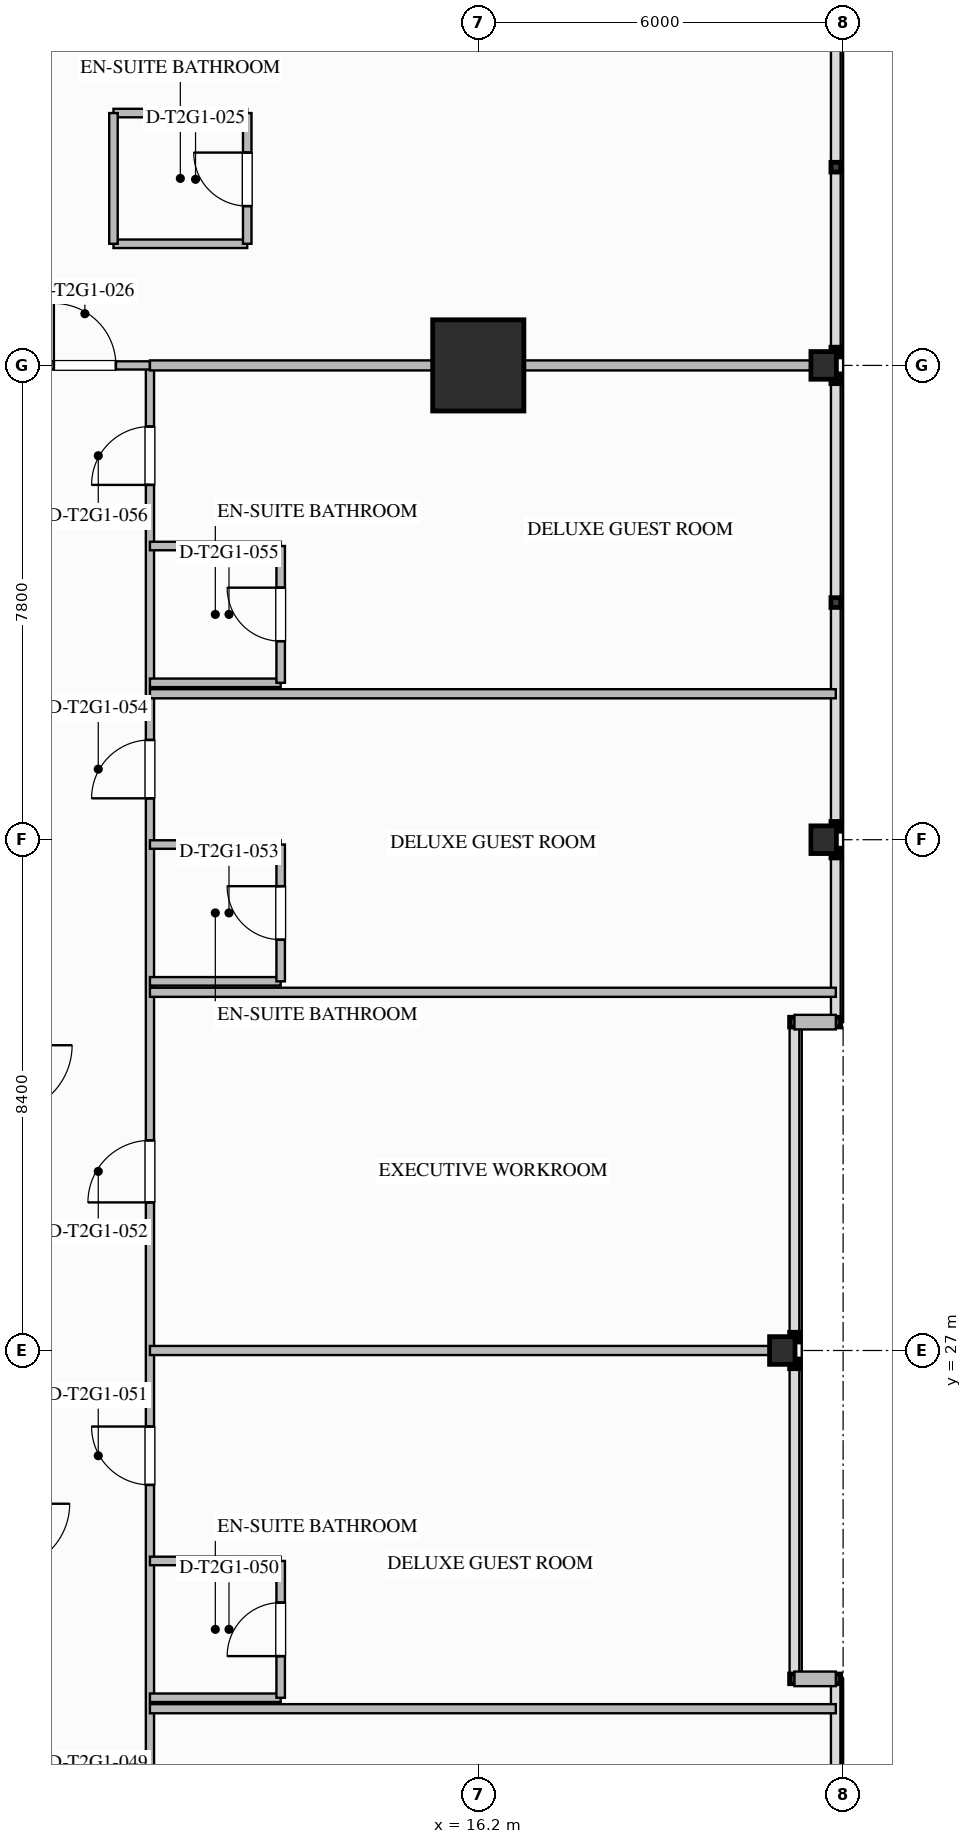
"""IFC4 building model, lengths in metres.
Left out: names, types, materials, properties, quantities, classifications, styles, units other than length and angle.
Written with IfcOpenShell. Run it as: python <this file> out.ifc"""

import sys

from ifc_helpers import new_model, si_unit, direction, frame, frame_2d, origin, origin_2d, place, context, subcontext, project, spatial, rectangle, i_section, extrude, element, fill, save


model = new_model("IFC4")
c1 = context("Model", 3, precision=1e-05, world=origin(), true_north=direction((0.0, 1.0)))
c2 = subcontext(c1, "Body", "Model", "MODEL_VIEW")
j1 = project(units=[si_unit("LENGTHUNIT", "METRE"), si_unit("PLANEANGLEUNIT", "RADIAN")], contexts=[c1])
p1 = place(None, origin())
s1 = spatial("IfcSite", under=j1, at=p1, CompositionType="ELEMENT")
p2 = place(p1, origin())
s2 = spatial("IfcBuilding", under=s1, at=p2, CompositionType="ELEMENT")
p3 = place(p2, frame((0.0, 0.0, 91.8)))
s3 = spatial("IfcBuildingStorey", under=s2, at=p3, CompositionType="ELEMENT", Elevation=91.8)
p4 = place(p3, frame((16.2, 43.2, 0.0), z_axis=(0.0, 0.0, 1.0), x_axis=(1.0, 0.0, 0.0)))
e1 = element("IfcColumn", 1, at=p4, inside=s3, PredefinedType="COLUMN", context=c2, shape_type="SweptSolid", body=[
    extrude(rectangle(XDim=1.5, YDim=1.5, at=origin_2d()), origin(), (0.0, 0.0, 1.0), 3.5),
])
for number, where, z_axis, x_axis in (
    (2, (21.2, 27.0, 0.0), (0.0, 0.0, 1.0), (1.0, 0.0, 0.0)),
    (3, (21.88, 35.4, 0.0), (0.0, 0.0, 1.0), (1.0, 0.0, 0.0)),
    (4, (21.88, 43.2, 0.0), (0.0, 0.0, 1.0), (1.0, 0.0, 0.0)),
):
    element("IfcColumn", number, at=place(p3, frame(where, z_axis=z_axis, x_axis=x_axis)), inside=s3, PredefinedType="COLUMN", context=c2, shape_type="SweptSolid", body=[
        extrude(i_section(OverallWidth=0.418, OverallDepth=0.455, WebThickness=0.042, FlangeThickness=0.068, FilletRadius=0.03, at=origin_2d()), origin(), (0.0, 0.0, 1.0), 3.497),
    ])
for number, where, z_axis, x_axis in (
    (5, (22.08, 32.4, 0.0), (0.0, 0.0, 1.0), (-1.0, 0.0, 0.0)),
    (6, (21.4, 21.6, 0.0), (0.0, 0.0, 1.0), (1.0, 0.0, 0.0)),
):
    element("IfcWall", number, at=place(p3, frame(where, z_axis=z_axis, x_axis=x_axis)), inside=s3, PredefinedType="STANDARD", context=c2, shape_type="SweptSolid", body=[
        extrude(rectangle(XDim=0.68, YDim=0.24, at=frame_2d((0.34, 0.0))), origin(), (0.0, 0.0, 1.0), 3.24),
    ])
p5 = place(p3, frame((10.8, 10.8, 0.0), z_axis=(0.0, 0.0, 1.0), x_axis=(0.0, 1.0, 0.0)))
e7 = element("IfcWall", 7, at=p5, inside=s3, PredefinedType="PARTITIONING", context=c2, shape_type="SweptSolid", body=[
    extrude(rectangle(XDim=32.4, YDim=0.135, at=frame_2d((16.2, 0.0))), origin(), (0.0, 0.0, 1.0), 3.24),
])
p6 = place(p5, frame((2.785, 0.0, 0.0)))
e8 = element("IfcOpeningElement", 8, at=p6, cuts=e7, PredefinedType="OPENING", context=c2, shape_type="SweptSolid", body=[
    extrude(rectangle(XDim=0.96, YDim=2.15, at=frame_2d((0.48, 1.075))), frame((0.0, 0.077, 0.0), z_axis=(0.0, -1.0, 0.0), x_axis=(1.0, 0.0, 0.0)), (0.0, 0.0, 1.0), 0.155),
])
p7 = place(p5, frame((7.939, 0.0, 0.0)))
e9 = element("IfcOpeningElement", 9, at=p7, cuts=e7, PredefinedType="OPENING", context=c2, shape_type="SweptSolid", body=[
    extrude(rectangle(XDim=0.96, YDim=2.15, at=frame_2d((0.48, 1.075))), frame((0.0, 0.077, 0.0), z_axis=(0.0, -1.0, 0.0), x_axis=(1.0, 0.0, 0.0)), (0.0, 0.0, 1.0), 0.155),
])
p8 = place(p5, frame((13.99, 0.0, 0.0)))
e10 = element("IfcOpeningElement", 10, at=p8, cuts=e7, PredefinedType="OPENING", context=c2, shape_type="SweptSolid", body=[
    extrude(rectangle(XDim=0.96, YDim=2.15, at=frame_2d((0.48, 1.075))), frame((0.0, 0.077, 0.0), z_axis=(0.0, -1.0, 0.0), x_axis=(1.0, 0.0, 0.0)), (0.0, 0.0, 1.0), 0.155),
])
p9 = place(p5, frame((18.635, 0.0, 0.0)))
e11 = element("IfcOpeningElement", 11, at=p9, cuts=e7, PredefinedType="OPENING", context=c2, shape_type="SweptSolid", body=[
    extrude(rectangle(XDim=1.02, YDim=2.15, at=frame_2d((0.51, 1.075))), frame((0.0, 0.077, 0.0), z_axis=(0.0, -1.0, 0.0), x_axis=(1.0, 0.0, 0.0)), (0.0, 0.0, 1.0), 0.155),
])
p10 = place(p5, frame((25.281, 0.0, 0.0)))
e12 = element("IfcOpeningElement", 12, at=p10, cuts=e7, PredefinedType="OPENING", context=c2, shape_type="SweptSolid", body=[
    extrude(rectangle(XDim=0.96, YDim=2.15, at=frame_2d((0.48, 1.075))), frame((0.0, 0.077, 0.0), z_axis=(0.0, -1.0, 0.0), x_axis=(1.0, 0.0, 0.0)), (0.0, 0.0, 1.0), 0.155),
])
p11 = place(p5, frame((30.435, 0.0, 0.0)))
e13 = element("IfcOpeningElement", 13, at=p11, cuts=e7, PredefinedType="OPENING", context=c2, shape_type="SweptSolid", body=[
    extrude(rectangle(XDim=0.96, YDim=2.15, at=frame_2d((0.48, 1.075))), frame((0.0, 0.077, 0.0), z_axis=(0.0, -1.0, 0.0), x_axis=(1.0, 0.0, 0.0)), (0.0, 0.0, 1.0), 0.155),
])
p12 = place(p3, frame((8.7, 43.2, 0.0), z_axis=(0.0, 0.0, 1.0), x_axis=(1.0, 0.0, 0.0)))
e14 = element("IfcWall", 14, at=p12, inside=s3, PredefinedType="PARTITIONING", context=c2, shape_type="SweptSolid", body=[
    extrude(rectangle(XDim=2.1, YDim=0.135, at=frame_2d((1.05, 0.0))), origin(), (0.0, 0.0, 1.0), 2.452),
])
p13 = place(p12, frame((0.52, 0.0, 0.0)))
e15 = element("IfcOpeningElement", 15, at=p13, cuts=e14, PredefinedType="OPENING", context=c2, shape_type="SweptSolid", body=[
    extrude(rectangle(XDim=1.02, YDim=2.15, at=frame_2d((0.51, 1.075))), frame((0.0, 0.077, 0.0), z_axis=(0.0, -1.0, 0.0), x_axis=(1.0, 0.0, 0.0)), (0.0, 0.0, 1.0), 0.155),
])
p14 = place(p3, frame((10.8, 43.2, 0.0), z_axis=(0.0, 0.0, 1.0), x_axis=(1.0, 0.0, 0.0)))
e16 = element("IfcWall", 16, at=p14, inside=s3, PredefinedType="PARTITIONING", context=c2, shape_type="SweptSolid", body=[
    extrude(rectangle(XDim=11.28, YDim=0.165, at=frame_2d((5.64, 0.0))), origin(), (0.0, 0.0, 1.0), 2.452),
])
for number, where, z_axis, x_axis in (
    (17, (10.2, 45.2, 0.0), (0.0, 0.0, 1.0), (1.0, 0.0, 0.0)),
    (18, (10.2, 47.35, 0.0), (0.0, 0.0, 1.0), (1.0, 0.0, 0.0)),
):
    element("IfcWall", number, at=place(p3, frame(where, z_axis=z_axis, x_axis=x_axis)), inside=s3, PredefinedType="PLUMBINGWALL", context=c2, shape_type="SweptSolid", body=[
        extrude(rectangle(XDim=2.2, YDim=0.14, at=frame_2d((1.1, 0.0))), origin(), (0.0, 0.0, 1.0), 3.24),
    ])
p15 = place(p3, frame((10.2, 45.2, 0.0), z_axis=(0.0, 0.0, 1.0), x_axis=(0.0, 1.0, 0.0)))
e19 = element("IfcWall", 19, at=p15, inside=s3, PredefinedType="PLUMBINGWALL", context=c2, shape_type="SweptSolid", body=[
    extrude(rectangle(XDim=2.15, YDim=0.14, at=frame_2d((1.075, 0.0))), origin(), (0.0, 0.0, 1.0), 3.24),
])
p16 = place(p3, frame((12.4, 45.2, 0.0), z_axis=(0.0, 0.0, 1.0), x_axis=(0.0, 1.0, 0.0)))
e20 = element("IfcWall", 20, at=p16, inside=s3, PredefinedType="PLUMBINGWALL", context=c2, shape_type="SweptSolid", body=[
    extrude(rectangle(XDim=2.15, YDim=0.14, at=frame_2d((1.075, 0.0))), origin(), (0.0, 0.0, 1.0), 3.24),
])
p17 = place(p16, frame((0.62, 0.0, 0.0)))
e21 = element("IfcOpeningElement", 21, at=p17, cuts=e20, PredefinedType="OPENING", context=c2, shape_type="SweptSolid", body=[
    extrude(rectangle(XDim=0.88, YDim=2.1, at=frame_2d((0.44, 1.05))), frame((0.0, 0.08, 0.0), z_axis=(0.0, -1.0, 0.0), x_axis=(1.0, 0.0, 0.0)), (0.0, 0.0, 1.0), 0.16),
])
p18 = place(p3, frame((10.8, 21.109, 0.0), z_axis=(0.0, 0.0, 1.0), x_axis=(1.0, 0.0, 0.0)))
e22 = element("IfcWall", 22, at=p18, inside=s3, PredefinedType="PARTITIONING", context=c2, shape_type="SweptSolid", body=[
    extrude(rectangle(XDim=11.28, YDim=0.15, at=frame_2d((5.64, 0.0))), origin(), (0.0, 0.0, 1.0), 3.24),
])
for number, where, z_axis, x_axis in (
    (23, (10.8, 21.289, 0.0), (0.0, 0.0, 1.0), (1.0, 0.0, 0.0)),
    (24, (10.8, 23.539, 0.0), (0.0, 0.0, 1.0), (1.0, 0.0, 0.0)),
):
    element("IfcWall", number, at=place(p3, frame(where, z_axis=z_axis, x_axis=x_axis)), inside=s3, PredefinedType="PLUMBINGWALL", context=c2, shape_type="SweptSolid", body=[
        extrude(rectangle(XDim=2.15, YDim=0.14, at=frame_2d((1.075, 0.0))), origin(), (0.0, 0.0, 1.0), 3.24),
    ])
p19 = place(p3, frame((12.95, 21.289, 0.0), z_axis=(0.0, 0.0, 1.0), x_axis=(0.0, 1.0, 0.0)))
e25 = element("IfcWall", 25, at=p19, inside=s3, PredefinedType="PLUMBINGWALL", context=c2, shape_type="SweptSolid", body=[
    extrude(rectangle(XDim=2.25, YDim=0.14, at=frame_2d((1.125, 0.0))), origin(), (0.0, 0.0, 1.0), 3.24),
])
p20 = place(p19, frame((0.685, 0.0, 0.0)))
e26 = element("IfcOpeningElement", 26, at=p20, cuts=e25, PredefinedType="OPENING", context=c2, shape_type="SweptSolid", body=[
    extrude(rectangle(XDim=0.88, YDim=2.1, at=frame_2d((0.44, 1.05))), frame((0.0, 0.08, 0.0), z_axis=(0.0, -1.0, 0.0), x_axis=(1.0, 0.0, 0.0)), (0.0, 0.0, 1.0), 0.16),
])
p21 = place(p3, frame((10.8, 27.0, 0.0), z_axis=(0.0, 0.0, 1.0), x_axis=(1.0, 0.0, 0.0)))
e27 = element("IfcWall", 27, at=p21, inside=s3, PredefinedType="PARTITIONING", context=c2, shape_type="SweptSolid", body=[
    extrude(rectangle(XDim=10.6, YDim=0.15, at=frame_2d((5.3, 0.0))), origin(), (0.0, 0.0, 1.0), 2.452),
])
p22 = place(p3, frame((10.8, 32.891, 0.0), z_axis=(0.0, 0.0, 1.0), x_axis=(1.0, 0.0, 0.0)))
e28 = element("IfcWall", 28, at=p22, inside=s3, PredefinedType="PARTITIONING", context=c2, shape_type="SweptSolid", body=[
    extrude(rectangle(XDim=11.28, YDim=0.15, at=frame_2d((5.64, 0.0))), origin(), (0.0, 0.0, 1.0), 3.24),
])
p23 = place(p3, frame((10.8, 33.071, 0.0), z_axis=(0.0, 0.0, 1.0), x_axis=(1.0, 0.0, 0.0)))
e29 = element("IfcWall", 29, at=p23, inside=s3, PredefinedType="PLUMBINGWALL", context=c2, shape_type="SweptSolid", body=[
    extrude(rectangle(XDim=2.15, YDim=0.14, at=frame_2d((1.075, 0.0))), origin(), (0.0, 0.0, 1.0), 3.24),
])
p24 = place(p3, frame((10.8, 35.321, 0.0), z_axis=(0.0, 0.0, 1.0), x_axis=(1.0, 0.0, 0.0)))
e30 = element("IfcWall", 30, at=p24, inside=s3, PredefinedType="PLUMBINGWALL", context=c2, shape_type="SweptSolid", body=[
    extrude(rectangle(XDim=2.15, YDim=0.14, at=frame_2d((1.075, 0.0))), origin(), (0.0, 0.0, 1.0), 2.617),
])
p25 = place(p3, frame((12.95, 33.071, 0.0), z_axis=(0.0, 0.0, 1.0), x_axis=(0.0, 1.0, 0.0)))
e31 = element("IfcWall", 31, at=p25, inside=s3, PredefinedType="PLUMBINGWALL", context=c2, shape_type="SweptSolid", body=[
    extrude(rectangle(XDim=2.25, YDim=0.14, at=frame_2d((1.125, 0.0))), origin(), (0.0, 0.0, 1.0), 3.24),
])
p26 = place(p25, frame((0.685, 0.0, 0.0)))
e32 = element("IfcOpeningElement", 32, at=p26, cuts=e31, PredefinedType="OPENING", context=c2, shape_type="SweptSolid", body=[
    extrude(rectangle(XDim=0.88, YDim=2.1, at=frame_2d((0.44, 1.05))), frame((0.0, 0.08, 0.0), z_axis=(0.0, -1.0, 0.0), x_axis=(1.0, 0.0, 0.0)), (0.0, 0.0, 1.0), 0.16),
])
p27 = place(p3, frame((10.8, 37.8, 0.0), z_axis=(0.0, 0.0, 1.0), x_axis=(1.0, 0.0, 0.0)))
e33 = element("IfcWall", 33, at=p27, inside=s3, PredefinedType="PARTITIONING", context=c2, shape_type="SweptSolid", body=[
    extrude(rectangle(XDim=11.28, YDim=0.15, at=frame_2d((5.64, 0.0))), origin(), (0.0, 0.0, 1.0), 3.24),
])
for number, where, z_axis, x_axis in (
    (34, (10.8, 37.98, 0.0), (0.0, 0.0, 1.0), (1.0, 0.0, 0.0)),
    (35, (10.8, 40.23, 0.0), (0.0, 0.0, 1.0), (1.0, 0.0, 0.0)),
):
    element("IfcWall", number, at=place(p3, frame(where, z_axis=z_axis, x_axis=x_axis)), inside=s3, PredefinedType="PLUMBINGWALL", context=c2, shape_type="SweptSolid", body=[
        extrude(rectangle(XDim=2.15, YDim=0.14, at=frame_2d((1.075, 0.0))), origin(), (0.0, 0.0, 1.0), 3.24),
    ])
p28 = place(p3, frame((12.95, 37.98, 0.0), z_axis=(0.0, 0.0, 1.0), x_axis=(0.0, 1.0, 0.0)))
e36 = element("IfcWall", 36, at=p28, inside=s3, PredefinedType="PLUMBINGWALL", context=c2, shape_type="SweptSolid", body=[
    extrude(rectangle(XDim=2.25, YDim=0.14, at=frame_2d((1.125, 0.0))), origin(), (0.0, 0.0, 1.0), 3.24),
])
p29 = place(p28, frame((0.685, 0.0, 0.0)))
e37 = element("IfcOpeningElement", 37, at=p29, cuts=e36, PredefinedType="OPENING", context=c2, shape_type="SweptSolid", body=[
    extrude(rectangle(XDim=0.88, YDim=2.1, at=frame_2d((0.44, 1.05))), frame((0.0, 0.08, 0.0), z_axis=(0.0, -1.0, 0.0), x_axis=(1.0, 0.0, 0.0)), (0.0, 0.0, 1.0), 0.16),
])
p30 = place(p17, origin())
e38 = element("IfcDoor", 38, at=p30, inside=s3, OperationType="SINGLE_SWING_RIGHT", PredefinedType="DOOR", context=c2, shape_type="SweptSolid", body=[
    extrude(rectangle(XDim=0.88, YDim=2.1, at=frame_2d((0.44, 1.05))), frame((0.0, 0.025, 0.0), z_axis=(0.0, -1.0, 0.0), x_axis=(1.0, 0.0, 0.0)), (0.0, 0.0, 1.0), 0.05),
])
fill(e21, e38)
p31 = place(p13, origin())
e39 = element("IfcDoor", 39, at=p31, inside=s3, OperationType="SINGLE_SWING_LEFT", PredefinedType="DOOR", context=c2, shape_type="SweptSolid", body=[
    extrude(rectangle(XDim=1.02, YDim=2.15, at=frame_2d((0.51, 1.075))), frame((0.0, 0.025, 0.0), z_axis=(0.0, -1.0, 0.0), x_axis=(1.0, 0.0, 0.0)), (0.0, 0.0, 1.0), 0.05),
])
fill(e15, e39)
p32 = place(p20, origin())
e40 = element("IfcDoor", 40, at=p32, inside=s3, OperationType="SINGLE_SWING_LEFT", PredefinedType="DOOR", context=c2, shape_type="SweptSolid", body=[
    extrude(rectangle(XDim=0.88, YDim=2.1, at=frame_2d((0.44, 1.05))), frame((0.0, 0.025, 0.0), z_axis=(0.0, -1.0, 0.0), x_axis=(1.0, 0.0, 0.0)), (0.0, 0.0, 1.0), 0.05),
])
fill(e26, e40)
p33 = place(p8, origin())
e41 = element("IfcDoor", 41, at=p33, inside=s3, OperationType="SINGLE_SWING_RIGHT", PredefinedType="DOOR", context=c2, shape_type="SweptSolid", body=[
    extrude(rectangle(XDim=0.96, YDim=2.15, at=frame_2d((0.48, 1.075))), frame((0.0, 0.025, 0.0), z_axis=(0.0, -1.0, 0.0), x_axis=(1.0, 0.0, 0.0)), (0.0, 0.0, 1.0), 0.05),
])
fill(e10, e41)
p34 = place(p9, origin())
e42 = element("IfcDoor", 42, at=p34, inside=s3, OperationType="SINGLE_SWING_LEFT", PredefinedType="DOOR", context=c2, shape_type="SweptSolid", body=[
    extrude(rectangle(XDim=1.02, YDim=2.15, at=frame_2d((0.51, 1.075))), frame((0.0, 0.025, 0.0), z_axis=(0.0, -1.0, 0.0), x_axis=(1.0, 0.0, 0.0)), (0.0, 0.0, 1.0), 0.05),
])
fill(e11, e42)
p35 = place(p26, origin())
e43 = element("IfcDoor", 43, at=p35, inside=s3, OperationType="SINGLE_SWING_RIGHT", PredefinedType="DOOR", context=c2, shape_type="SweptSolid", body=[
    extrude(rectangle(XDim=0.88, YDim=2.1, at=frame_2d((0.44, 1.05))), frame((0.0, 0.025, 0.0), z_axis=(0.0, -1.0, 0.0), x_axis=(1.0, 0.0, 0.0)), (0.0, 0.0, 1.0), 0.05),
])
fill(e32, e43)
p36 = place(p10, origin())
e44 = element("IfcDoor", 44, at=p36, inside=s3, OperationType="SINGLE_SWING_LEFT", PredefinedType="DOOR", context=c2, shape_type="SweptSolid", body=[
    extrude(rectangle(XDim=0.96, YDim=2.15, at=frame_2d((0.48, 1.075))), frame((0.0, 0.025, 0.0), z_axis=(0.0, -1.0, 0.0), x_axis=(1.0, 0.0, 0.0)), (0.0, 0.0, 1.0), 0.05),
])
fill(e12, e44)
p37 = place(p29, origin())
e45 = element("IfcDoor", 45, at=p37, inside=s3, OperationType="SINGLE_SWING_RIGHT", PredefinedType="DOOR", context=c2, shape_type="SweptSolid", body=[
    extrude(rectangle(XDim=0.88, YDim=2.1, at=frame_2d((0.44, 1.05))), frame((0.0, 0.025, 0.0), z_axis=(0.0, -1.0, 0.0), x_axis=(1.0, 0.0, 0.0)), (0.0, 0.0, 1.0), 0.05),
])
fill(e37, e45)
p38 = place(p11, origin())
e46 = element("IfcDoor", 46, at=p38, inside=s3, OperationType="SINGLE_SWING_LEFT", PredefinedType="DOOR", context=c2, shape_type="SweptSolid", body=[
    extrude(rectangle(XDim=0.96, YDim=2.15, at=frame_2d((0.48, 1.075))), frame((0.0, 0.025, 0.0), z_axis=(0.0, -1.0, 0.0), x_axis=(1.0, 0.0, 0.0)), (0.0, 0.0, 1.0), 0.05),
])
fill(e13, e46)
save(model, sys.argv[1])
